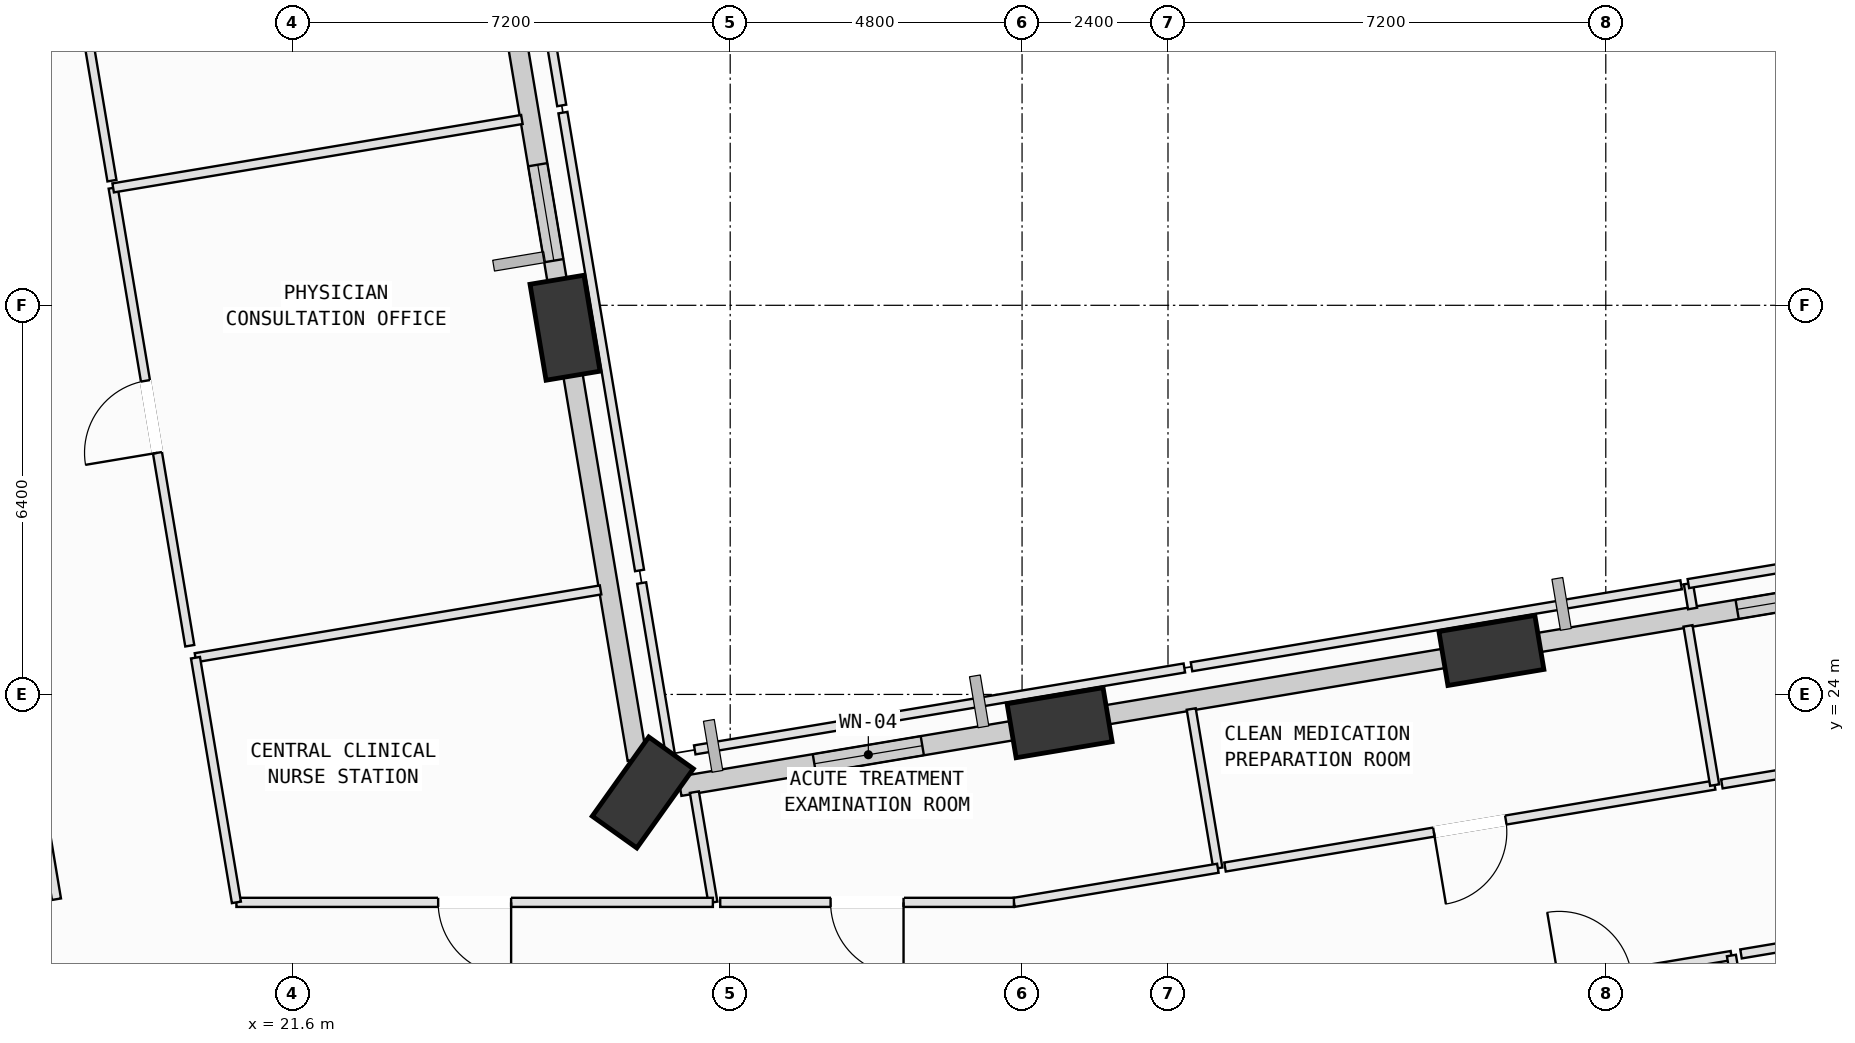
"""IFC4 building model, lengths in metres.
Left out: names, types, materials, properties, quantities, classifications, styles, units other than length and angle.
Written with IfcOpenShell. Run it as: python <this file> out.ifc"""

import sys

from ifc_helpers import new_model, si_unit, direction, frame, frame_2d, origin, origin_2d, place, context, subcontext, project, spatial, rectangle, extrude, element, fill, save


model = new_model("IFC4")
c1 = context("Model", 3, precision=1e-05, world=origin(), true_north=direction((0.0, 1.0)))
c2 = subcontext(c1, "Body", "Model", "MODEL_VIEW")
j1 = project(units=[si_unit("LENGTHUNIT", "METRE"), si_unit("PLANEANGLEUNIT", "RADIAN")], contexts=[c1])
p1 = place(None, origin())
s1 = spatial("IfcSite", under=j1, at=p1, CompositionType="ELEMENT")
p2 = place(p1, origin())
s2 = spatial("IfcBuilding", under=s1, at=p2, CompositionType="ELEMENT")
p3 = place(p2, frame((0.0, 0.0, 63.0)))
s3 = spatial("IfcBuildingStorey", under=s2, at=p3, CompositionType="ELEMENT", Elevation=63.0)
p4 = place(p3, frame((41.319, 24.723, 0.002), z_axis=(6.1056083e-05, 0.031993387491, 0.999488078683), x_axis=(-0.986598620057, -0.163080593075, 0.005280441624)))
e1 = element("IfcColumn", 1, at=p4, inside=s3, PredefinedType="COLUMN", context=c2, shape_type="SweptSolid", body=[
    extrude(rectangle(XDim=1.6, YDim=0.9, at=origin_2d()), origin(), (0.0, 0.0, 1.0), 3.999),
])
p5 = place(p3, frame((34.217, 23.534, 0.002), z_axis=(0.005253421904, 0.002626710952, 0.999982750825), x_axis=(-0.588700850168, 0.808350400049, 0.000969407814)))
e2 = element("IfcColumn", 2, at=p5, inside=s3, PredefinedType="COLUMN", context=c2, shape_type="SweptSolid", body=[
    extrude(rectangle(XDim=1.6, YDim=0.9, at=origin_2d()), origin(), (0.0, 0.0, 1.0), 3.997),
])
p6 = place(p3, frame((27.363, 22.387, 0.002), z_axis=(0.010258727431, -0.025768946284, 0.999615285957), x_axis=(0.238518577535, 0.970875389317, 0.022580225612)))
e3 = element("IfcColumn", 3, at=p6, inside=s3, PredefinedType="COLUMN", context=c2, shape_type="SweptSolid", body=[
    extrude(rectangle(XDim=1.6, YDim=0.9, at=origin_2d()), origin(), (0.0, 0.0, 1.0), 3.998),
])
p7 = place(p3, frame((26.083, 30.031, 0.002), z_axis=(-0.021426220941, -0.03131524599, 0.999279876924), x_axis=(0.42032356273, 0.906602224927, 0.037423366641)))
e4 = element("IfcColumn", 4, at=p7, inside=s3, PredefinedType="COLUMN", context=c2, shape_type="SweptSolid", body=[
    extrude(rectangle(XDim=1.6, YDim=0.9, at=origin_2d()), origin(), (0.0, 0.0, 1.0), 4.0),
])
p8 = place(p3, frame((41.925, 24.824, 0.0), z_axis=(0.0, 0.0, 1.0), x_axis=(0.986285933786, 0.165045620407, 0.0)))
e5 = element("IfcWall", 5, at=p8, inside=s3, PredefinedType="SOLIDWALL", context=c2, shape_type="SweptSolid", body=[
    extrude(rectangle(XDim=6.0, YDim=0.32, at=frame_2d((3.0, 0.0))), origin(), (0.0, 0.0, 1.0), 3.165),
])
p9 = place(p8, frame((3.482, 0.0, 0.75)))
e6 = element("IfcOpeningElement", 6, at=p9, cuts=e5, PredefinedType="OPENING", context=c2, shape_type="SweptSolid", body=[
    extrude(rectangle(XDim=2.0, YDim=1.95, at=frame_2d((1.0, 0.975))), frame((0.0, 0.17, 0.0), z_axis=(0.0, -1.0, 0.0), x_axis=(1.0, 0.0, 0.0)), (0.0, 0.0, 1.0), 0.34),
])
p10 = place(p3, frame((34.828, 23.637, 0.0), z_axis=(0.0, 0.0, 1.0), x_axis=(0.986282386518, 0.165066816911, 0.0)))
e7 = element("IfcWall", 7, at=p10, inside=s3, PredefinedType="SOLIDWALL", context=c2, shape_type="SweptSolid", body=[
    extrude(rectangle(XDim=5.987, YDim=0.32, at=frame_2d((2.994, 0.0))), origin(), (0.0, 0.0, 1.0), 3.165),
])
p11 = place(p3, frame((27.971, 22.489, 0.0), z_axis=(0.0, 0.0, 1.0), x_axis=(0.986285585068, 0.165047704276, 0.0)))
e8 = element("IfcWall", 8, at=p11, inside=s3, PredefinedType="SOLIDWALL", context=c2, shape_type="SweptSolid", body=[
    extrude(rectangle(XDim=5.736, YDim=0.32, at=frame_2d((2.868, 0.0))), origin(), (0.0, 0.0, 1.0), 3.165),
])
p12 = place(p11, frame((2.243, 0.0, 0.75)))
e9 = element("IfcOpeningElement", 9, at=p12, cuts=e8, PredefinedType="OPENING", context=c2, shape_type="SweptSolid", body=[
    extrude(rectangle(XDim=1.8, YDim=2.05, at=frame_2d((0.9, 1.025))), frame((0.0, 0.17, 0.0), z_axis=(0.0, -1.0, 0.0), x_axis=(1.0, 0.0, 0.0)), (0.0, 0.0, 1.0), 0.34),
])
p13 = place(p3, frame((27.271, 22.933, 0.0), z_axis=(0.0, 0.0, 1.0), x_axis=(-0.165059175066, 0.986283665447, 0.0)))
e10 = element("IfcWall", 10, at=p13, inside=s3, PredefinedType="SOLIDWALL", context=c2, shape_type="SweptSolid", body=[
    extrude(rectangle(XDim=6.536, YDim=0.32, at=frame_2d((3.268, 0.0))), origin(), (0.0, 0.0, 1.0), 2.865),
])
p14 = place(p3, frame((25.993, 30.574, 0.0), z_axis=(0.0, 0.0, 1.0), x_axis=(-0.165052568098, 0.986284771131, 0.0)))
e11 = element("IfcWall", 11, at=p14, inside=s3, PredefinedType="SOLIDWALL", context=c2, shape_type="SweptSolid", body=[
    extrude(rectangle(XDim=5.997, YDim=0.32, at=frame_2d((2.998, 0.0))), origin(), (0.0, 0.0, 1.0), 3.165),
])
p15 = place(p14, frame((0.567, 0.0, 0.75)))
e12 = element("IfcOpeningElement", 12, at=p15, cuts=e11, PredefinedType="OPENING", context=c2, shape_type="SweptSolid", body=[
    extrude(rectangle(XDim=1.6, YDim=1.95, at=frame_2d((0.8, 0.975))), frame((0.0, 0.17, 0.0), z_axis=(0.0, -1.0, 0.0), x_axis=(1.0, 0.0, 0.0)), (0.0, 0.0, 1.0), 0.34),
])
p16 = place(p3, frame((40.788, 18.956, 0.0), z_axis=(0.0, 0.0, 1.0), x_axis=(0.98626281798, 0.165183697352, 0.0)))
e13 = element("IfcWall", 13, at=p16, inside=s3, PredefinedType="PARTITIONING", context=c2, shape_type="SweptSolid", body=[
    extrude(rectangle(XDim=4.54, YDim=0.15, at=frame_2d((2.27, 0.0))), origin(), (0.0, 0.0, 1.0), 3.78),
])
p17 = place(p16, frame((1.67, 0.0, 0.0)))
e14 = element("IfcOpeningElement", 14, at=p17, cuts=e13, PredefinedType="OPENING", context=c2, shape_type="SweptSolid", body=[
    extrude(rectangle(XDim=1.2, YDim=2.15, at=frame_2d((0.6, 1.075))), frame((0.0, 0.085, 0.0), z_axis=(0.0, -1.0, 0.0), x_axis=(1.0, 0.0, 0.0)), (0.0, 0.0, 1.0), 0.17),
])
p18 = place(p3, frame((45.266, 19.706, 0.0), z_axis=(0.0, 0.0, 1.0), x_axis=(0.165031074777, -0.98628836775, 0.0)))
e15 = element("IfcWall", 15, at=p18, inside=s3, PredefinedType="PARTITIONING", context=c2, shape_type="SweptSolid", body=[
    extrude(rectangle(XDim=13.215, YDim=0.15, at=frame_2d((6.607, 0.0))), origin(), (0.0, 0.0, 1.0), 3.78),
])
p19 = place(p3, frame((45.424, 19.732, 0.0), z_axis=(0.0, 0.0, 1.0), x_axis=(0.986290516722, 0.165018231188, 0.0)))
e16 = element("IfcWall", 16, at=p19, inside=s3, PredefinedType="PARTITIONING", context=c2, shape_type="SweptSolid", body=[
    extrude(rectangle(XDim=4.539, YDim=0.15, at=frame_2d((2.27, 0.0))), origin(), (0.0, 0.0, 1.0), 3.78),
])
p20 = place(p19, frame((1.67, 0.0, 0.0)))
e17 = element("IfcOpeningElement", 17, at=p20, cuts=e16, PredefinedType="OPENING", context=c2, shape_type="SweptSolid", body=[
    extrude(rectangle(XDim=1.2, YDim=2.15, at=frame_2d((0.6, 1.075))), frame((0.0, 0.085, 0.0), z_axis=(0.0, -1.0, 0.0), x_axis=(1.0, 0.0, 0.0)), (0.0, 0.0, 1.0), 0.17),
])
p21 = place(p3, frame((16.888, 25.603, 0.0), z_axis=(0.0, 0.0, 1.0), x_axis=(0.165082339721, -0.986279788454, 0.0)))
e18 = element("IfcWall", 18, at=p21, inside=s3, PredefinedType="PARTITIONING", context=c2, shape_type="SweptSolid", body=[
    extrude(rectangle(XDim=5.04, YDim=0.15, at=frame_2d((2.52, 0.0))), origin(), (0.0, 0.0, 1.0), 3.78),
])
p22 = place(p3, frame((20.006, 24.604, 0.0), z_axis=(0.0, 0.0, 1.0), x_axis=(0.986281351786, 0.165072999363, 0.0)))
e19 = element("IfcWall", 19, at=p22, inside=s3, PredefinedType="PARTITIONING", context=c2, shape_type="SweptSolid", body=[
    extrude(rectangle(XDim=6.755, YDim=0.15, at=frame_2d((3.377, 0.0))), origin(), (0.0, 0.0, 1.0), 3.78),
])
p23 = place(p3, frame((27.344, 25.832, 0.0), z_axis=(0.0, 0.0, 1.0), x_axis=(0.164899046121, -0.98631045041, 0.0)))
e20 = element("IfcWall", 20, at=p23, inside=s3, PredefinedType="PARTITIONING", context=c2, shape_type="SweptSolid", body=[
    extrude(rectangle(XDim=2.85, YDim=0.15, at=frame_2d((1.425, 0.0))), origin(), (0.0, 0.0, 1.0), 3.78),
])
p24 = place(p3, frame((28.211, 22.393, 0.0), z_axis=(0.0, 0.0, 1.0), x_axis=(0.165346517666, -0.98623553429, 0.0)))
e21 = element("IfcWall", 21, at=p24, inside=s3, PredefinedType="PARTITIONING", context=c2, shape_type="SweptSolid", body=[
    extrude(rectangle(XDim=1.838, YDim=0.15, at=frame_2d((0.919, 0.0))), origin(), (0.0, 0.0, 1.0), 3.78),
])
p25 = place(p3, frame((28.515, 20.58, 0.0), z_axis=(0.0, 0.0, 1.0), x_axis=(-1.0, 0.0, 0.0)))
e22 = element("IfcWall", 22, at=p25, inside=s3, PredefinedType="PARTITIONING", context=c2, shape_type="SweptSolid", body=[
    extrude(rectangle(XDim=7.836, YDim=0.15, at=frame_2d((3.918, 0.0))), origin(), (0.0, 0.0, 1.0), 3.78),
])
p26 = place(p25, frame((3.318, 0.0, 0.0)))
e23 = element("IfcOpeningElement", 23, at=p26, cuts=e22, PredefinedType="OPENING", context=c2, shape_type="SweptSolid", body=[
    extrude(rectangle(XDim=1.2, YDim=2.15, at=frame_2d((0.6, 1.075))), frame((0.0, 0.085, 0.0), z_axis=(0.0, -1.0, 0.0), x_axis=(1.0, 0.0, 0.0)), (0.0, 0.0, 1.0), 0.17),
])
p27 = place(p3, frame((20.679, 20.58, 0.0), z_axis=(0.0, 0.0, 1.0), x_axis=(-0.164922980953, 0.9863064485, 0.0)))
e24 = element("IfcWall", 24, at=p27, inside=s3, PredefinedType="PARTITIONING", context=c2, shape_type="SweptSolid", body=[
    extrude(rectangle(XDim=4.08, YDim=0.15, at=frame_2d((2.04, 0.0))), origin(), (0.0, 0.0, 1.0), 3.78),
])
p28 = place(p3, frame((28.217, 23.088, 0.0), z_axis=(0.0, 0.0, 1.0), x_axis=(0.986291085267, 0.16501483304, 0.0)))
e25 = element("IfcWall", 25, at=p28, inside=s3, PredefinedType="PARTITIONING", context=c2, shape_type="SweptSolid", body=[
    extrude(rectangle(XDim=8.164, YDim=0.15, at=frame_2d((4.082, 0.0))), origin(), (0.0, 0.0, 1.0), 3.78),
])
p29 = place(p3, frame((36.382, 23.76, 0.0), z_axis=(0.0, 0.0, 1.0), x_axis=(0.164950635961, -0.986301823833, 0.0)))
e26 = element("IfcWall", 26, at=p29, inside=s3, PredefinedType="PARTITIONING", context=c2, shape_type="SweptSolid", body=[
    extrude(rectangle(XDim=2.655, YDim=0.15, at=frame_2d((1.328, 0.0))), origin(), (0.0, 0.0, 1.0), 3.78),
])
p30 = place(p3, frame((36.82, 21.141, 0.0), z_axis=(0.0, 0.0, 1.0), x_axis=(-0.98629673406, -0.16498106674, 0.0)))
e27 = element("IfcWall", 27, at=p30, inside=s3, PredefinedType="PARTITIONING", context=c2, shape_type="SweptSolid", body=[
    extrude(rectangle(XDim=3.401, YDim=0.15, at=frame_2d((1.7, 0.0))), origin(), (0.0, 0.0, 1.0), 3.78),
])
p31 = place(p3, frame((33.466, 20.58, 0.0), z_axis=(0.0, 0.0, 1.0), x_axis=(-1.0, 0.0, 0.0)))
e28 = element("IfcWall", 28, at=p31, inside=s3, PredefinedType="PARTITIONING", context=c2, shape_type="SweptSolid", body=[
    extrude(rectangle(XDim=4.83, YDim=0.15, at=frame_2d((2.415, 0.0))), origin(), (0.0, 0.0, 1.0), 3.78),
])
p32 = place(p31, frame((1.815, 0.0, 0.0)))
e29 = element("IfcOpeningElement", 29, at=p32, cuts=e28, PredefinedType="OPENING", context=c2, shape_type="SweptSolid", body=[
    extrude(rectangle(XDim=1.2, YDim=2.15, at=frame_2d((0.6, 1.075))), frame((0.0, 0.085, 0.0), z_axis=(0.0, -1.0, 0.0), x_axis=(1.0, 0.0, 0.0)), (0.0, 0.0, 1.0), 0.17),
])
p33 = place(p3, frame((44.99, 22.509, 0.0), z_axis=(0.0, 0.0, 1.0), x_axis=(-0.986271610427, -0.165131191679, 0.0)))
e30 = element("IfcWall", 30, at=p33, inside=s3, PredefinedType="PARTITIONING", context=c2, shape_type="SweptSolid", body=[
    extrude(rectangle(XDim=8.164, YDim=0.15, at=frame_2d((4.082, 0.0))), origin(), (0.0, 0.0, 1.0), 3.78),
])
p34 = place(p33, frame((3.482, 0.0, 0.0)))
e31 = element("IfcOpeningElement", 31, at=p34, cuts=e30, PredefinedType="OPENING", context=c2, shape_type="SweptSolid", body=[
    extrude(rectangle(XDim=1.2, YDim=2.15, at=frame_2d((0.6, 1.075))), frame((0.0, 0.085, 0.0), z_axis=(0.0, -1.0, 0.0), x_axis=(1.0, 0.0, 0.0)), (0.0, 0.0, 1.0), 0.17),
])
p35 = place(p3, frame((36.387, 24.455, 0.0), z_axis=(0.0, 0.0, 1.0), x_axis=(0.986276480352, 0.165102102666, 0.0)))
e32 = element("IfcWall", 32, at=p35, inside=s3, PredefinedType="PARTITIONING", context=c2, shape_type="SweptSolid", body=[
    extrude(rectangle(XDim=8.164, YDim=0.15, at=frame_2d((4.082, 0.0))), origin(), (0.0, 0.0, 1.0), 3.165),
])
p36 = place(p3, frame((44.552, 25.127, 0.0), z_axis=(0.0, 0.0, 1.0), x_axis=(0.165010492381, -0.986291811486, 0.0)))
e33 = element("IfcWall", 33, at=p36, inside=s3, PredefinedType="PARTITIONING", context=c2, shape_type="SweptSolid", body=[
    extrude(rectangle(XDim=2.654, YDim=0.15, at=frame_2d((1.327, 0.0))), origin(), (0.0, 0.0, 1.0), 3.78),
])
p37 = place(p3, frame((53.591, 23.948, 0.0), z_axis=(0.0, 0.0, 1.0), x_axis=(-0.986276285111, -0.165103268981, 0.0)))
e34 = element("IfcWall", 34, at=p37, inside=s3, PredefinedType="PARTITIONING", context=c2, shape_type="SweptSolid", body=[
    extrude(rectangle(XDim=8.6, YDim=0.15, at=frame_2d((4.3, 0.0))), origin(), (0.0, 0.0, 1.0), 3.78),
])
p38 = place(p37, frame((3.84, 0.0, 0.0)))
e35 = element("IfcOpeningElement", 35, at=p38, cuts=e34, PredefinedType="OPENING", context=c2, shape_type="SweptSolid", body=[
    extrude(rectangle(XDim=0.92, YDim=2.1, at=frame_2d((0.46, 1.05))), frame((0.0, 0.085, 0.0), z_axis=(0.0, -1.0, 0.0), x_axis=(1.0, 0.0, 0.0)), (0.0, 0.0, 1.0), 0.17),
])
p39 = place(p3, frame((44.627, 25.413, 0.0), z_axis=(0.0, 0.0, 1.0), x_axis=(-0.165637087874, 0.986186774967, 0.0)))
e36 = element("IfcWall", 36, at=p39, inside=s3, PredefinedType="PARTITIONING", context=c2, shape_type="SweptSolid", body=[
    extrude(rectangle(XDim=0.416, YDim=0.15, at=frame_2d((0.208, 0.0))), origin(), (0.0, 0.0, 1.0), 3.78),
])
p40 = place(p3, frame((44.558, 25.823, 0.0), z_axis=(0.0, 0.0, 1.0), x_axis=(0.986293996802, 0.164997429895, 0.0)))
e37 = element("IfcWall", 37, at=p40, inside=s3, PredefinedType="PARTITIONING", context=c2, shape_type="SweptSolid", body=[
    extrude(rectangle(XDim=8.6, YDim=0.15, at=frame_2d((4.3, 0.0))), origin(), (0.0, 0.0, 1.0), 3.165),
])
p41 = place(p3, frame((19.912, 24.801, 0.0), z_axis=(0.0, 0.0, 1.0), x_axis=(-0.165036777902, 0.986287413455, 0.0)))
e38 = element("IfcWall", 38, at=p41, inside=s3, PredefinedType="PARTITIONING", context=c2, shape_type="SweptSolid", body=[
    extrude(rectangle(XDim=7.635, YDim=0.15, at=frame_2d((3.817, 0.0))), origin(), (0.0, 0.0, 1.0), 3.78),
])
p42 = place(p41, frame((3.217, 0.0, 0.0)))
e39 = element("IfcOpeningElement", 39, at=p42, cuts=e38, PredefinedType="OPENING", context=c2, shape_type="SweptSolid", body=[
    extrude(rectangle(XDim=1.2, YDim=2.15, at=frame_2d((0.6, 1.075))), frame((0.0, 0.085, 0.0), z_axis=(0.0, -1.0, 0.0), x_axis=(1.0, 0.0, 0.0)), (0.0, 0.0, 1.0), 0.17),
])
p43 = place(p3, frame((18.652, 32.331, 0.0), z_axis=(0.0, 0.0, 1.0), x_axis=(0.986282359513, 0.165066978267, 0.0)))
e40 = element("IfcWall", 40, at=p43, inside=s3, PredefinedType="PARTITIONING", context=c2, shape_type="SweptSolid", body=[
    extrude(rectangle(XDim=6.815, YDim=0.15, at=frame_2d((3.408, 0.0))), origin(), (0.0, 0.0, 1.0), 3.78),
])
p44 = place(p3, frame((26.049, 33.569, 0.0), z_axis=(0.0, 0.0, 1.0), x_axis=(0.165036777902, -0.986287413455, 0.0)))
e41 = element("IfcWall", 41, at=p44, inside=s3, PredefinedType="PARTITIONING", context=c2, shape_type="SweptSolid", body=[
    extrude(rectangle(XDim=7.635, YDim=0.15, at=frame_2d((3.817, 0.0))), origin(), (0.0, 0.0, 1.0), 3.78),
])
p45 = place(p3, frame((18.632, 32.45, 0.0), z_axis=(0.0, 0.0, 1.0), x_axis=(-0.165068018391, 0.986282185434, 0.0)))
e42 = element("IfcWall", 42, at=p45, inside=s3, PredefinedType="PARTITIONING", context=c2, shape_type="SweptSolid", body=[
    extrude(rectangle(XDim=7.87, YDim=0.15, at=frame_2d((3.935, 0.0))), origin(), (0.0, 0.0, 1.0), 3.78),
])
p46 = place(p45, frame((3.475, 0.0, 0.0)))
e43 = element("IfcOpeningElement", 43, at=p46, cuts=e42, PredefinedType="OPENING", context=c2, shape_type="SweptSolid", body=[
    extrude(rectangle(XDim=0.92, YDim=2.1, at=frame_2d((0.46, 1.05))), frame((0.0, 0.085, 0.0), z_axis=(0.0, -1.0, 0.0), x_axis=(1.0, 0.0, 0.0)), (0.0, 0.0, 1.0), 0.17),
])
p47 = place(p3, frame((24.73, 41.449, 0.0), z_axis=(0.0, 0.0, 1.0), x_axis=(0.165068018391, -0.986282185434, 0.0)))
e44 = element("IfcWall", 44, at=p47, inside=s3, PredefinedType="PARTITIONING", context=c2, shape_type="SweptSolid", body=[
    extrude(rectangle(XDim=7.87, YDim=0.15, at=frame_2d((3.935, 0.0))), origin(), (0.0, 0.0, 1.0), 3.78),
])
p48 = place(p9, origin())
e45 = element("IfcWindow", 45, at=p48, inside=s3, PartitioningType="SINGLE_PANEL", PredefinedType="WINDOW", context=c2, shape_type="SweptSolid", body=[
    extrude(rectangle(XDim=2.0, YDim=1.95, at=frame_2d((1.0, 0.975))), frame((0.0, 0.03, 0.0), z_axis=(0.0, -1.0, 0.0), x_axis=(1.0, 0.0, 0.0)), (0.0, 0.0, 1.0), 0.06),
])
fill(e6, e45)
p49 = place(p12, origin())
e46 = element("IfcWindow", 46, at=p49, inside=s3, PartitioningType="SINGLE_PANEL", PredefinedType="WINDOW", context=c2, shape_type="SweptSolid", body=[
    extrude(rectangle(XDim=1.8, YDim=2.05, at=frame_2d((0.9, 1.025))), frame((0.0, 0.03, 0.0), z_axis=(0.0, -1.0, 0.0), x_axis=(1.0, 0.0, 0.0)), (0.0, 0.0, 1.0), 0.06),
])
fill(e9, e46)
p50 = place(p15, origin())
e47 = element("IfcWindow", 47, at=p50, inside=s3, PartitioningType="SINGLE_PANEL", PredefinedType="WINDOW", context=c2, shape_type="SweptSolid", body=[
    extrude(rectangle(XDim=1.6, YDim=1.95, at=frame_2d((0.8, 0.975))), frame((0.0, 0.03, 0.0), z_axis=(0.0, -1.0, 0.0), x_axis=(1.0, 0.0, 0.0)), (0.0, 0.0, 1.0), 0.06),
])
fill(e12, e47)
p51 = place(p26, origin())
e48 = element("IfcDoor", 48, at=p51, inside=s3, OperationType="SINGLE_SWING_LEFT", PredefinedType="DOOR", context=c2, shape_type="SweptSolid", body=[
    extrude(rectangle(XDim=1.2, YDim=2.15, at=frame_2d((0.6, 1.075))), frame((0.0, 0.025, 0.0), z_axis=(0.0, -1.0, 0.0), x_axis=(1.0, 0.0, 0.0)), (0.0, 0.0, 1.0), 0.05),
])
fill(e23, e48)
p52 = place(p32, origin())
e49 = element("IfcDoor", 49, at=p52, inside=s3, OperationType="SINGLE_SWING_LEFT", PredefinedType="DOOR", context=c2, shape_type="SweptSolid", body=[
    extrude(rectangle(XDim=1.2, YDim=2.15, at=frame_2d((0.6, 1.075))), frame((0.0, 0.025, 0.0), z_axis=(0.0, -1.0, 0.0), x_axis=(1.0, 0.0, 0.0)), (0.0, 0.0, 1.0), 0.05),
])
fill(e29, e49)
p53 = place(p34, origin())
e50 = element("IfcDoor", 50, at=p53, inside=s3, OperationType="SINGLE_SWING_RIGHT", PredefinedType="DOOR", context=c2, shape_type="SweptSolid", body=[
    extrude(rectangle(XDim=1.2, YDim=2.15, at=frame_2d((0.6, 1.075))), frame((0.0, 0.025, 0.0), z_axis=(0.0, -1.0, 0.0), x_axis=(1.0, 0.0, 0.0)), (0.0, 0.0, 1.0), 0.05),
])
fill(e31, e50)
p54 = place(p42, origin())
e51 = element("IfcDoor", 51, at=p54, inside=s3, OperationType="SINGLE_SWING_LEFT", PredefinedType="DOOR", context=c2, shape_type="SweptSolid", body=[
    extrude(rectangle(XDim=1.2, YDim=2.15, at=frame_2d((0.6, 1.075))), frame((0.0, 0.025, 0.0), z_axis=(0.0, -1.0, 0.0), x_axis=(1.0, 0.0, 0.0)), (0.0, 0.0, 1.0), 0.05),
])
fill(e39, e51)
save(model, sys.argv[1])
